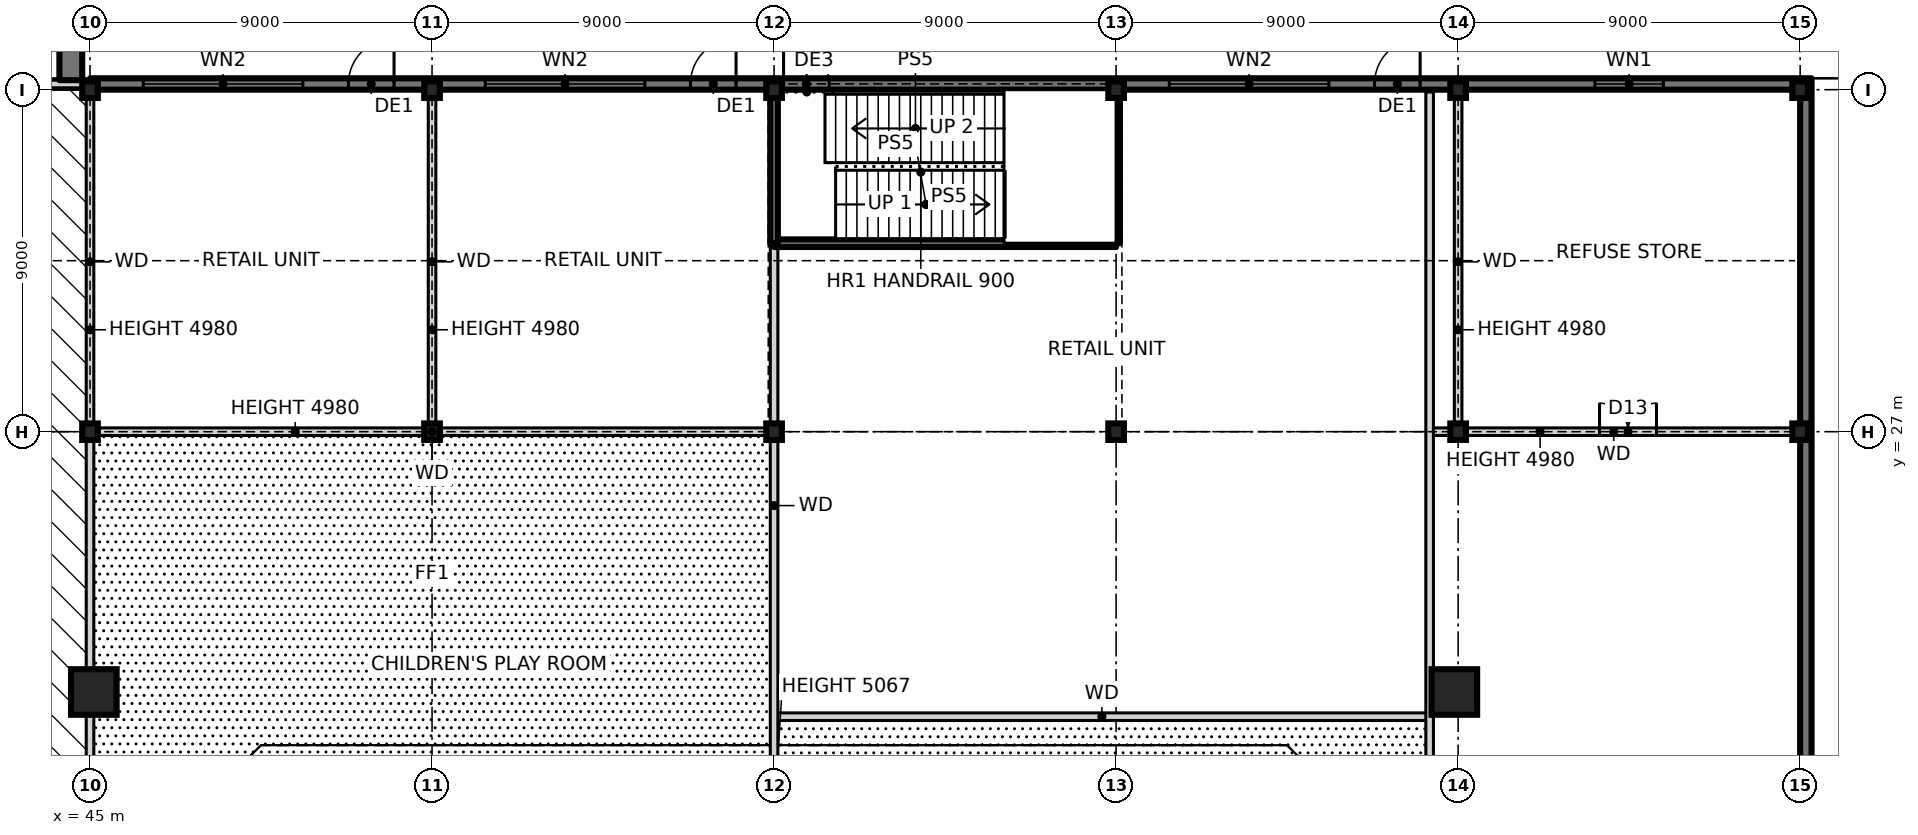
"""IFC4 building model, lengths in metres.
Left out: names, types, materials, properties, quantities, classifications, styles, units other than length and angle.
Written with IfcOpenShell. Run it as: python <this file> out.ifc"""

import sys

from ifc_helpers import new_model, si_unit, direction, frame, frame_2d, origin, origin_2d, place, context, subcontext, project, spatial, rectangle, hollow_rectangle, i_section, extrude, element, fill, save


model = new_model("IFC4")
c1 = context("Model", 3, precision=1e-05, world=origin(), true_north=direction((0.0, 1.0)))
c2 = subcontext(c1, "Body", "Model", "MODEL_VIEW")
j1 = project(units=[si_unit("LENGTHUNIT", "METRE"), si_unit("PLANEANGLEUNIT", "RADIAN")], contexts=[c1])
p1 = place(None, origin())
s1 = spatial("IfcSite", under=j1, at=p1, CompositionType="ELEMENT")
p2 = place(p1, origin())
s2 = spatial("IfcBuilding", under=s1, at=p2, CompositionType="ELEMENT")
p3 = place(p2, origin())
s3 = spatial("IfcBuildingStorey", under=s2, at=p3, CompositionType="ELEMENT", Elevation=0.0)
for number, where, z_axis, x_axis in (
    (1, (80.9, 20.15, 0.0), (0.0, 0.0, 1.0), (1.0, 0.0, 0.0)),
    (2, (45.1, 20.15, 0.0), (0.0, 0.0, 1.0), (1.0, 0.0, 0.0)),
):
    element("IfcColumn", number, at=place(p3, frame(where, z_axis=z_axis, x_axis=x_axis)), inside=s3, PredefinedType="COLUMN", context=c2, shape_type="SweptSolid", body=[
        extrude(hollow_rectangle(XDim=1.2, YDim=1.2, WallThickness=0.07, at=origin_2d()), origin(), (0.0, 0.0, 1.0), 6.0),
    ])
for number, where, z_axis, x_axis in (
    (3, (45.0, 27.0, 0.0), (0.0, 0.0, 1.0), (1.0, 0.0, 0.0)),
    (4, (45.0, 36.0, 0.0), (0.0, 0.0, 1.0), (1.0, 0.0, 0.0)),
    (5, (54.0, 27.0, 0.0), (0.0, 0.0, 1.0), (1.0, 0.0, 0.0)),
    (6, (54.0, 36.0, 0.0), (0.0, 0.0, 1.0), (1.0, 0.0, 0.0)),
    (7, (63.0, 27.0, 0.0), (0.0, 0.0, 1.0), (1.0, 0.0, 0.0)),
    (8, (63.0, 36.0, 0.0), (0.0, 0.0, 1.0), (1.0, 0.0, 0.0)),
    (9, (72.0, 27.0, 0.0), (0.0, 0.0, 1.0), (1.0, 0.0, 0.0)),
    (10, (72.0, 36.0, 0.0), (0.0, 0.0, 1.0), (1.0, 0.0, 0.0)),
    (11, (81.0, 27.0, 0.0), (0.0, 0.0, 1.0), (1.0, 0.0, 0.0)),
    (12, (81.0, 36.0, 0.0), (0.0, 0.0, 1.0), (1.0, 0.0, 0.0)),
    (13, (90.0, 27.0, 0.0), (0.0, 0.0, 1.0), (1.0, 0.0, 0.0)),
    (14, (90.0, 36.0, 0.0), (0.0, 0.0, 1.0), (1.0, 0.0, 0.0)),
):
    element("IfcColumn", number, at=place(p3, frame(where, z_axis=z_axis, x_axis=x_axis)), inside=s3, PredefinedType="COLUMN", context=c2, shape_type="SweptSolid", body=[
        extrude(i_section(OverallWidth=0.411, OverallDepth=0.434, WebThickness=0.036, FlangeThickness=0.057, at=origin_2d()), origin(), (0.0, 0.0, 1.0), 6.0),
    ])
p4 = place(p3, frame((45.0, 36.15, -0.25), z_axis=(0.0, 0.0, 1.0), x_axis=(-1.0, 0.0, 0.0)))
e15 = element("IfcWall", 15, at=p4, inside=s3, PredefinedType="SOLIDWALL", context=c2, shape_type="SweptSolid", body=[
    extrude(rectangle(XDim=9.0, YDim=0.2, at=frame_2d((4.5, 0.0))), origin(), (0.0, 0.0, 1.0), 6.25),
])
p5 = place(p4, frame((3.3, 0.0, 0.25)))
e16 = element("IfcOpeningElement", 16, at=p5, cuts=e15, PredefinedType="OPENING", context=c2, shape_type="SweptSolid", body=[
    extrude(rectangle(XDim=2.4, YDim=3.0, at=frame_2d((1.2, 1.5))), frame((0.0, 0.11, 0.0), z_axis=(0.0, -1.0, 0.0), x_axis=(1.0, 0.0, 0.0)), (0.0, 0.0, 1.0), 0.22),
])
p6 = place(p3, frame((54.0, 36.15, -0.25), z_axis=(0.0, 0.0, 1.0), x_axis=(-1.0, 0.0, 0.0)))
e17 = element("IfcWall", 17, at=p6, inside=s3, PredefinedType="SOLIDWALL", context=c2, shape_type="SweptSolid", body=[
    extrude(rectangle(XDim=9.0, YDim=0.3, at=frame_2d((4.5, 0.0))), origin(), (0.0, 0.0, 1.0), 6.25),
])
p7 = place(p6, frame((1.0, 0.0, 0.25)))
e18 = element("IfcOpeningElement", 18, at=p7, cuts=e17, PredefinedType="OPENING", context=c2, shape_type="SweptSolid", body=[
    extrude(rectangle(XDim=1.2, YDim=2.4, at=frame_2d((0.6, 1.2))), frame((0.0, 0.16, 0.0), z_axis=(0.0, -1.0, 0.0), x_axis=(1.0, 0.0, 0.0)), (0.0, 0.0, 1.0), 0.32),
])
p8 = place(p6, frame((3.4, 0.0, 0.85)))
e19 = element("IfcOpeningElement", 19, at=p8, cuts=e17, PredefinedType="OPENING", context=c2, shape_type="SweptSolid", body=[
    extrude(rectangle(XDim=4.2, YDim=3.6, at=frame_2d((2.1, 1.8))), frame((0.0, 0.16, 0.0), z_axis=(0.0, -1.0, 0.0), x_axis=(1.0, 0.0, 0.0)), (0.0, 0.0, 1.0), 0.32),
])
p9 = place(p3, frame((63.0, 36.15, -0.25), z_axis=(0.0, 0.0, 1.0), x_axis=(-1.0, 0.0, 0.0)))
e20 = element("IfcWall", 20, at=p9, inside=s3, PredefinedType="SOLIDWALL", context=c2, shape_type="SweptSolid", body=[
    extrude(rectangle(XDim=9.0, YDim=0.3, at=frame_2d((4.5, 0.0))), origin(), (0.0, 0.0, 1.0), 6.25),
])
p10 = place(p9, frame((1.0, 0.0, 0.25)))
e21 = element("IfcOpeningElement", 21, at=p10, cuts=e20, PredefinedType="OPENING", context=c2, shape_type="SweptSolid", body=[
    extrude(rectangle(XDim=1.2, YDim=2.4, at=frame_2d((0.6, 1.2))), frame((0.0, 0.16, 0.0), z_axis=(0.0, -1.0, 0.0), x_axis=(1.0, 0.0, 0.0)), (0.0, 0.0, 1.0), 0.32),
])
p11 = place(p9, frame((3.4, 0.0, 0.85)))
e22 = element("IfcOpeningElement", 22, at=p11, cuts=e20, PredefinedType="OPENING", context=c2, shape_type="SweptSolid", body=[
    extrude(rectangle(XDim=4.2, YDim=3.6, at=frame_2d((2.1, 1.8))), frame((0.0, 0.16, 0.0), z_axis=(0.0, -1.0, 0.0), x_axis=(1.0, 0.0, 0.0)), (0.0, 0.0, 1.0), 0.32),
])
p12 = place(p3, frame((72.0, 36.15, -0.25), z_axis=(0.0, 0.0, 1.0), x_axis=(-1.0, 0.0, 0.0)))
e23 = element("IfcWall", 23, at=p12, inside=s3, PredefinedType="SOLIDWALL", context=c2, shape_type="SweptSolid", body=[
    extrude(rectangle(XDim=9.0, YDim=0.3, at=frame_2d((4.5, 0.0))), origin(), (0.0, 0.0, 1.0), 6.25),
])
p13 = place(p12, frame((7.55, 0.0, 0.25)))
e24 = element("IfcOpeningElement", 24, at=p13, cuts=e23, PredefinedType="OPENING", context=c2, shape_type="SweptSolid", body=[
    extrude(rectangle(XDim=1.2, YDim=2.4, at=frame_2d((0.6, 1.2))), frame((0.0, 0.16, 0.0), z_axis=(0.0, -1.0, 0.0), x_axis=(1.0, 0.0, 0.0)), (0.0, 0.0, 1.0), 0.32),
])
p14 = place(p3, frame((81.0, 36.15, -0.25), z_axis=(0.0, 0.0, 1.0), x_axis=(-1.0, 0.0, 0.0)))
e25 = element("IfcWall", 25, at=p14, inside=s3, PredefinedType="SOLIDWALL", context=c2, shape_type="SweptSolid", body=[
    extrude(rectangle(XDim=9.0, YDim=0.3, at=frame_2d((4.5, 0.0))), origin(), (0.0, 0.0, 1.0), 6.25),
])
p15 = place(p14, frame((1.0, 0.0, 0.25)))
e26 = element("IfcOpeningElement", 26, at=p15, cuts=e25, PredefinedType="OPENING", context=c2, shape_type="SweptSolid", body=[
    extrude(rectangle(XDim=1.2, YDim=2.4, at=frame_2d((0.6, 1.2))), frame((0.0, 0.16, 0.0), z_axis=(0.0, -1.0, 0.0), x_axis=(1.0, 0.0, 0.0)), (0.0, 0.0, 1.0), 0.32),
])
p16 = place(p14, frame((3.4, 0.0, 0.85)))
e27 = element("IfcOpeningElement", 27, at=p16, cuts=e25, PredefinedType="OPENING", context=c2, shape_type="SweptSolid", body=[
    extrude(rectangle(XDim=4.2, YDim=3.6, at=frame_2d((2.1, 1.8))), frame((0.0, 0.16, 0.0), z_axis=(0.0, -1.0, 0.0), x_axis=(1.0, 0.0, 0.0)), (0.0, 0.0, 1.0), 0.32),
])
p17 = place(p3, frame((90.0, 36.15, -0.25), z_axis=(0.0, 0.0, 1.0), x_axis=(-1.0, 0.0, 0.0)))
e28 = element("IfcWall", 28, at=p17, inside=s3, PredefinedType="SOLIDWALL", context=c2, shape_type="SweptSolid", body=[
    extrude(rectangle(XDim=9.0, YDim=0.3, at=frame_2d((4.5, 0.0))), origin(), (0.0, 0.0, 1.0), 6.25),
])
p18 = place(p17, frame((3.6, 0.0, 1.15)))
e29 = element("IfcOpeningElement", 29, at=p18, cuts=e28, PredefinedType="OPENING", context=c2, shape_type="SweptSolid", body=[
    extrude(rectangle(XDim=1.8, YDim=2.4, at=frame_2d((0.9, 1.2))), frame((0.0, 0.16, 0.0), z_axis=(0.0, -1.0, 0.0), x_axis=(1.0, 0.0, 0.0)), (0.0, 0.0, 1.0), 0.32),
])
p19 = place(p3, frame((90.15, -36.3, -0.25), z_axis=(0.0, 0.0, 1.0), x_axis=(0.0, 1.0, 0.0)))
e30 = element("IfcWall", 30, at=p19, inside=s3, PredefinedType="SOLIDWALL", context=c2, shape_type="SweptSolid", body=[
    extrude(rectangle(XDim=72.6, YDim=0.3, at=frame_2d((36.3, 0.0))), origin(), (0.0, 0.0, 1.0), 5.23),
])
p20 = place(p19, frame((33.15, 0.0, 0.25)))
e31 = element("IfcOpeningElement", 31, at=p20, cuts=e30, PredefinedType="OPENING", context=c2, shape_type="SweptSolid", body=[
    extrude(rectangle(XDim=1.2, YDim=2.4, at=frame_2d((0.6, 1.2))), frame((0.0, 0.16, 0.0), z_axis=(0.0, -1.0, 0.0), x_axis=(1.0, 0.0, 0.0)), (0.0, 0.0, 1.0), 0.32),
])
p21 = place(p19, frame((47.3, 0.0, 0.25)))
e32 = element("IfcOpeningElement", 32, at=p21, cuts=e30, PredefinedType="OPENING", context=c2, shape_type="SweptSolid", body=[
    extrude(rectangle(XDim=6.0, YDim=4.5, at=frame_2d((3.0, 2.25))), frame((0.0, 0.16, 0.0), z_axis=(0.0, -1.0, 0.0), x_axis=(1.0, 0.0, 0.0)), (0.0, 0.0, 1.0), 0.32),
])
p22 = place(p3, frame((44.494, 36.25, -0.15), z_axis=(0.0, 0.0, 1.0), x_axis=(0.0, 1.0, 0.0)))
e33 = element("IfcWall", 33, at=p22, inside=s3, PredefinedType="SOLIDWALL", context=c2, shape_type="SweptSolid", body=[
    extrude(rectangle(XDim=3.05, YDim=0.6, at=frame_2d((1.525, 0.0))), origin(), (0.0, 0.0, 1.0), 9.15),
])
p23 = place(p3, frame((63.0, 19.5, 0.0), z_axis=(0.0, 0.0, 1.0), x_axis=(1.0, 0.0, 0.0)))
e34 = element("IfcWall", 34, at=p23, inside=s3, PredefinedType="SOLIDWALL", context=c2, shape_type="SweptSolid", body=[
    extrude(rectangle(XDim=17.25, YDim=0.2, at=frame_2d((8.625, 0.0))), origin(), (0.0, 0.0, 1.0), 5.75),
])
p24 = place(p3, frame((45.0, 27.0, 0.0), z_axis=(0.0, 0.0, 1.0), x_axis=(1.0, 0.0, 0.0)))
e35 = element("IfcWall", 35, at=p24, inside=s3, PredefinedType="SOLIDWALL", context=c2, shape_type="SweptSolid", body=[
    extrude(rectangle(XDim=18.0, YDim=0.2, at=frame_2d((9.0, 0.0))), origin(), (0.0, 0.0, 1.0), 4.98),
])
p25 = place(p3, frame((80.25, 27.0, 0.0), z_axis=(0.0, 0.0, 1.0), x_axis=(1.0, 0.0, 0.0)))
e36 = element("IfcWall", 36, at=p25, inside=s3, PredefinedType="SOLIDWALL", context=c2, shape_type="SweptSolid", body=[
    extrude(rectangle(XDim=9.69, YDim=0.2, at=frame_2d((4.845, 0.0))), origin(), (0.0, 0.0, 1.0), 4.98),
])
p26 = place(p25, frame((4.47, 0.0, 0.0)))
e37 = element("IfcOpeningElement", 37, at=p26, cuts=e36, PredefinedType="OPENING", context=c2, shape_type="SweptSolid", body=[
    extrude(rectangle(XDim=1.5, YDim=2.4, at=frame_2d((0.75, 1.2))), frame((0.0, 0.11, 0.0), z_axis=(0.0, -1.0, 0.0), x_axis=(1.0, 0.0, 0.0)), (0.0, 0.0, 1.0), 0.22),
])
p27 = place(p3, frame((63.0, 31.96, -0.25), z_axis=(0.0, 0.0, 1.0), x_axis=(1.0, 0.0, 0.0)))
e38 = element("IfcWall", 38, at=p27, inside=s3, PredefinedType="SOLIDWALL", context=c2, shape_type="SweptSolid", body=[
    extrude(rectangle(XDim=9.0, YDim=0.2, at=frame_2d((4.5, 0.0))), origin(), (0.0, 0.0, 1.0), 6.25),
])
p28 = place(p3, frame((81.0, 27.0, 0.0), z_axis=(0.0, 0.0, 1.0), x_axis=(0.0, 1.0, 0.0)))
e39 = element("IfcWall", 39, at=p28, inside=s3, PredefinedType="SOLIDWALL", context=c2, shape_type="SweptSolid", body=[
    extrude(rectangle(XDim=8.94, YDim=0.2, at=frame_2d((4.47, 0.0))), origin(), (0.0, 0.0, 1.0), 4.98),
])
p29 = place(p3, frame((80.25, -4.2, 0.0), z_axis=(0.0, 0.0, 1.0), x_axis=(0.0, 1.0, 0.0)))
e40 = element("IfcWall", 40, at=p29, inside=s3, PredefinedType="SOLIDWALL", context=c2, shape_type="SweptSolid", body=[
    extrude(rectangle(XDim=40.14, YDim=0.2, at=frame_2d((20.07, 0.0))), origin(), (0.0, 0.0, 1.0), 5.75),
])
p30 = place(p29, frame((2.85, 0.0, 0.0)))
e41 = element("IfcOpeningElement", 41, at=p30, cuts=e40, PredefinedType="OPENING", context=c2, shape_type="SweptSolid", body=[
    extrude(rectangle(XDim=1.5, YDim=2.4, at=frame_2d((0.75, 1.2))), frame((0.0, 0.11, 0.0), z_axis=(0.0, -1.0, 0.0), x_axis=(1.0, 0.0, 0.0)), (0.0, 0.0, 1.0), 0.22),
])
for number, where, z_axis, x_axis in (
    (42, (72.0, 31.96, -0.25), (0.0, 0.0, 1.0), (0.0, 1.0, 0.0)),
    (43, (63.0, 31.96, -0.25), (0.0, 0.0, 1.0), (0.0, 1.0, 0.0)),
):
    element("IfcWall", number, at=place(p3, frame(where, z_axis=z_axis, x_axis=x_axis)), inside=s3, PredefinedType="SOLIDWALL", context=c2, shape_type="SweptSolid", body=[
        extrude(rectangle(XDim=3.823, YDim=0.2, at=frame_2d((1.911, 0.0))), origin(), (0.0, 0.0, 1.0), 6.25),
    ])
p31 = place(p3, frame((54.0, 27.0, 0.0), z_axis=(0.0, 0.0, 1.0), x_axis=(0.0, 1.0, 0.0)))
e44 = element("IfcWall", 44, at=p31, inside=s3, PredefinedType="SOLIDWALL", context=c2, shape_type="SweptSolid", body=[
    extrude(rectangle(XDim=8.94, YDim=0.2, at=frame_2d((4.47, 0.0))), origin(), (0.0, 0.0, 1.0), 4.98),
])
p32 = place(p3, frame((63.0, 18.15, 0.0), z_axis=(0.0, 0.0, 1.0), x_axis=(0.0, 1.0, 0.0)))
e45 = element("IfcWall", 45, at=p32, inside=s3, PredefinedType="SOLIDWALL", context=c2, shape_type="SweptSolid", body=[
    extrude(rectangle(XDim=13.81, YDim=0.2, at=frame_2d((6.905, 0.0))), origin(), (0.0, 0.0, 1.0), 5.75),
])
p33 = place(p3, frame((45.0, -27.0, 0.0), z_axis=(0.0, 0.0, 1.0), x_axis=(0.0, 1.0, 0.0)))
e46 = element("IfcWall", 46, at=p33, inside=s3, PredefinedType="SOLIDWALL", context=c2, shape_type="SweptSolid", body=[
    extrude(rectangle(XDim=54.0, YDim=0.2, at=frame_2d((27.0, 0.0))), origin(), (0.0, 0.0, 1.0), 5.75),
])
p34 = place(p33, frame((18.75, 0.0, 0.0)))
e47 = element("IfcOpeningElement", 47, at=p34, cuts=e46, PredefinedType="OPENING", context=c2, shape_type="SweptSolid", body=[
    extrude(rectangle(XDim=1.8, YDim=2.4, at=frame_2d((0.9, 1.2))), frame((0.0, 0.11, 0.0), z_axis=(0.0, -1.0, 0.0), x_axis=(1.0, 0.0, 0.0)), (0.0, 0.0, 1.0), 0.22),
])
p35 = place(p3, frame((45.0, 27.0, 0.0), z_axis=(0.0, 0.0, 1.0), x_axis=(0.0, 1.0, 0.0)))
e48 = element("IfcWall", 48, at=p35, inside=s3, PredefinedType="SOLIDWALL", context=c2, shape_type="SweptSolid", body=[
    extrude(rectangle(XDim=8.94, YDim=0.2, at=frame_2d((4.47, 0.0))), origin(), (0.0, 0.0, 1.0), 4.98),
])
p36 = place(p7, frame((1.2, 0.0, 0.0), z_axis=(0.0, 0.0, 1.0), x_axis=(-1.0, 0.0, 0.0)))
e49 = element("IfcDoor", 49, at=p36, inside=s3, OperationType="SINGLE_SWING_RIGHT", PredefinedType="DOOR", context=c2, shape_type="SweptSolid", body=[
    extrude(rectangle(XDim=1.2, YDim=2.4, at=frame_2d((0.6, 1.2))), frame((0.0, 0.025, 0.0), z_axis=(0.0, -1.0, 0.0), x_axis=(1.0, 0.0, 0.0)), (0.0, 0.0, 1.0), 0.05),
])
fill(e18, e49)
p37 = place(p8, origin())
e50 = element("IfcWindow", 50, at=p37, inside=s3, PartitioningType="SINGLE_PANEL", PredefinedType="WINDOW", context=c2, shape_type="SweptSolid", body=[
    extrude(rectangle(XDim=4.2, YDim=3.6, at=frame_2d((2.1, 1.8))), frame((0.0, 0.03, 0.0), z_axis=(0.0, -1.0, 0.0), x_axis=(1.0, 0.0, 0.0)), (0.0, 0.0, 1.0), 0.06),
])
fill(e19, e50)
p38 = place(p10, frame((1.2, 0.0, 0.0), z_axis=(0.0, 0.0, 1.0), x_axis=(-1.0, 0.0, 0.0)))
e51 = element("IfcDoor", 51, at=p38, inside=s3, OperationType="SINGLE_SWING_RIGHT", PredefinedType="DOOR", context=c2, shape_type="SweptSolid", body=[
    extrude(rectangle(XDim=1.2, YDim=2.4, at=frame_2d((0.6, 1.2))), frame((0.0, 0.025, 0.0), z_axis=(0.0, -1.0, 0.0), x_axis=(1.0, 0.0, 0.0)), (0.0, 0.0, 1.0), 0.05),
])
fill(e21, e51)
p39 = place(p11, origin())
e52 = element("IfcWindow", 52, at=p39, inside=s3, PartitioningType="SINGLE_PANEL", PredefinedType="WINDOW", context=c2, shape_type="SweptSolid", body=[
    extrude(rectangle(XDim=4.2, YDim=3.6, at=frame_2d((2.1, 1.8))), frame((0.0, 0.03, 0.0), z_axis=(0.0, -1.0, 0.0), x_axis=(1.0, 0.0, 0.0)), (0.0, 0.0, 1.0), 0.06),
])
fill(e22, e52)
p40 = place(p13, frame((1.2, 0.0, 0.0), z_axis=(0.0, 0.0, 1.0), x_axis=(-1.0, 0.0, 0.0)))
e53 = element("IfcDoor", 53, at=p40, inside=s3, OperationType="SINGLE_SWING_LEFT", PredefinedType="DOOR", context=c2, shape_type="SweptSolid", body=[
    extrude(rectangle(XDim=1.2, YDim=2.4, at=frame_2d((0.6, 1.2))), frame((0.0, 0.025, 0.0), z_axis=(0.0, -1.0, 0.0), x_axis=(1.0, 0.0, 0.0)), (0.0, 0.0, 1.0), 0.05),
])
fill(e24, e53)
p41 = place(p15, frame((1.2, 0.0, 0.0), z_axis=(0.0, 0.0, 1.0), x_axis=(-1.0, 0.0, 0.0)))
e54 = element("IfcDoor", 54, at=p41, inside=s3, OperationType="SINGLE_SWING_RIGHT", PredefinedType="DOOR", context=c2, shape_type="SweptSolid", body=[
    extrude(rectangle(XDim=1.2, YDim=2.4, at=frame_2d((0.6, 1.2))), frame((0.0, 0.025, 0.0), z_axis=(0.0, -1.0, 0.0), x_axis=(1.0, 0.0, 0.0)), (0.0, 0.0, 1.0), 0.05),
])
fill(e26, e54)
p42 = place(p16, origin())
e55 = element("IfcWindow", 55, at=p42, inside=s3, PartitioningType="SINGLE_PANEL", PredefinedType="WINDOW", context=c2, shape_type="SweptSolid", body=[
    extrude(rectangle(XDim=4.2, YDim=3.6, at=frame_2d((2.1, 1.8))), frame((0.0, 0.03, 0.0), z_axis=(0.0, -1.0, 0.0), x_axis=(1.0, 0.0, 0.0)), (0.0, 0.0, 1.0), 0.06),
])
fill(e27, e55)
p43 = place(p18, origin())
e56 = element("IfcWindow", 56, at=p43, inside=s3, PartitioningType="SINGLE_PANEL", PredefinedType="WINDOW", context=c2, shape_type="SweptSolid", body=[
    extrude(rectangle(XDim=1.8, YDim=2.4, at=frame_2d((0.9, 1.2))), frame((0.0, 0.03, 0.0), z_axis=(0.0, -1.0, 0.0), x_axis=(1.0, 0.0, 0.0)), (0.0, 0.0, 1.0), 0.06),
])
fill(e29, e56)
p44 = place(p26, origin())
e57 = element("IfcDoor", 57, at=p44, inside=s3, OperationType="DOUBLE_DOOR_SINGLE_SWING", PredefinedType="DOOR", context=c2, shape_type="SweptSolid", body=[
    extrude(rectangle(XDim=1.5, YDim=2.4, at=frame_2d((0.75, 1.2))), frame((0.0, 0.025, 0.0), z_axis=(0.0, -1.0, 0.0), x_axis=(1.0, 0.0, 0.0)), (0.0, 0.0, 1.0), 0.05),
])
fill(e37, e57)
save(model, sys.argv[1])
